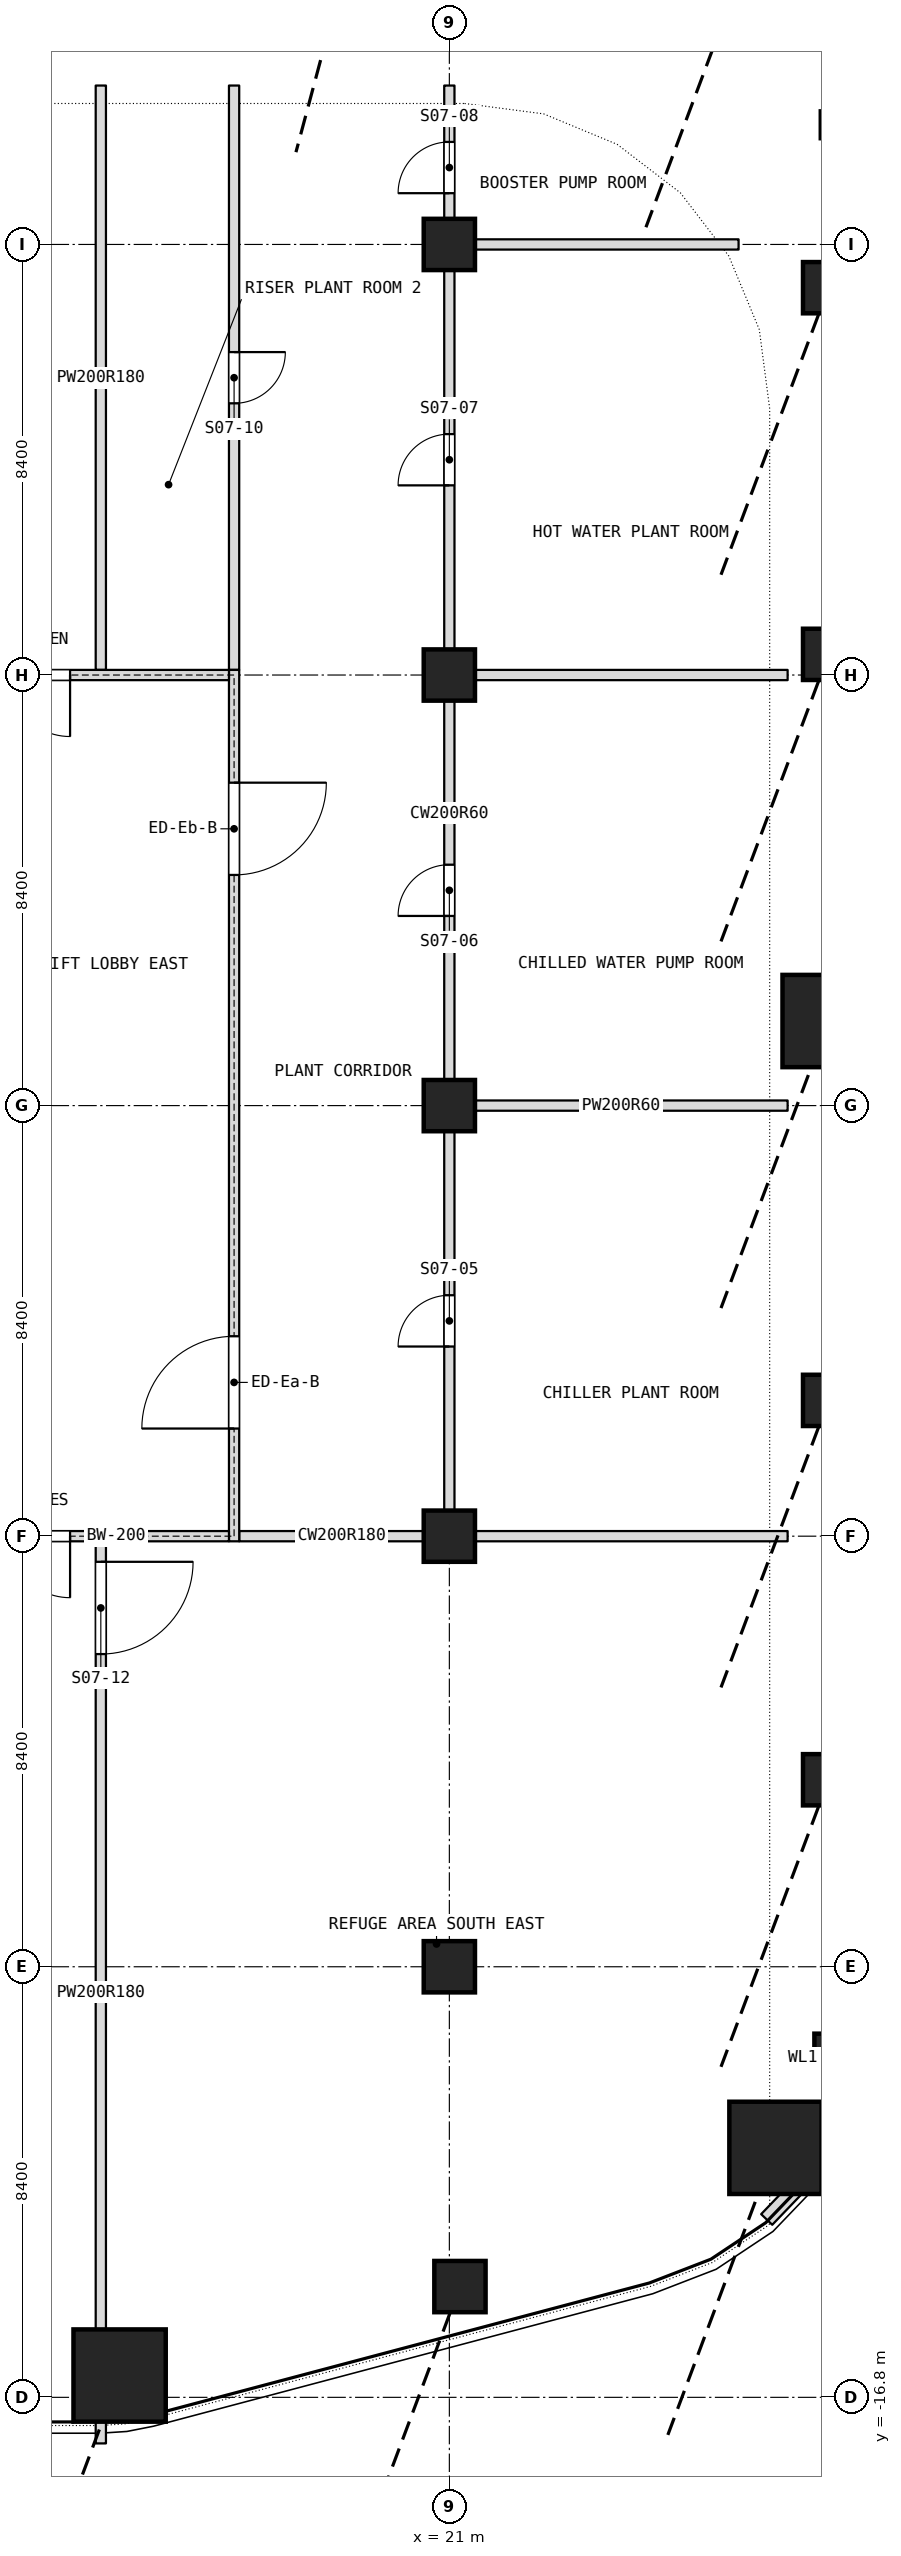
"""IFC4 building model, lengths in metres.
Left out: names, types, materials, properties, quantities, classifications, styles, units other than length and angle.
Written with IfcOpenShell. Run it as: python <this file> out.ifc"""

import sys

from ifc_helpers import new_model, si_unit, direction, frame, frame_2d, origin, origin_2d, place, context, subcontext, project, spatial, rectangle, i_section, extrude, element, fill, save


model = new_model("IFC4")
c1 = context("Model", 3, precision=1e-05, world=origin(), true_north=direction((0.0, 1.0)))
c2 = subcontext(c1, "Body", "Model", "MODEL_VIEW")
j1 = project(units=[si_unit("LENGTHUNIT", "METRE"), si_unit("PLANEANGLEUNIT", "RADIAN")], contexts=[c1])
p1 = place(None, origin())
s1 = spatial("IfcSite", under=j1, at=p1, CompositionType="ELEMENT")
p2 = place(p1, origin())
s2 = spatial("IfcBuilding", under=s1, at=p2, CompositionType="ELEMENT")
p3 = place(p2, frame((0.0, 0.0, 86.9)))
s3 = spatial("IfcBuildingStorey", under=s2, at=p3, CompositionType="ELEMENT", Elevation=86.9)
for number, where, z_axis, x_axis in (
    (1, (21.0, -8.4, 0.0), (0.0, 0.0, 1.0), (1.0, 0.0, 0.0)),
    (2, (21.0, 0.0, 0.0), (0.0, 0.0, 1.0), (1.0, 0.0, 0.0)),
    (3, (21.0, 8.4, 0.0), (0.0, 0.0, 1.0), (1.0, 0.0, 0.0)),
    (4, (21.0, 16.8, 0.0), (0.0, 0.0, 1.0), (1.0, 0.0, 0.0)),
    (5, (21.0, 25.2, 0.0), (0.0, 0.0, 1.0), (1.0, 0.0, 0.0)),
):
    element("IfcColumn", number, at=place(p3, frame(where, z_axis=z_axis, x_axis=x_axis)), inside=s3, PredefinedType="COLUMN", context=c2, shape_type="SweptSolid", body=[
        extrude(rectangle(XDim=1.0, YDim=1.0, at=origin_2d()), origin(), (0.0, 0.0, 1.0), 10.8),
    ])
p4 = place(p3, frame((28.4, 27.534, -0.3), z_axis=(0.0, 0.0, 1.0), x_axis=(1.0, 0.0, 0.0)))
e6 = element("IfcColumn", 6, at=p4, inside=s3, PredefinedType="COLUMN", context=c2, shape_type="SweptSolid", body=[
    extrude(i_section(OverallWidth=0.306, OverallDepth=0.524, WebThickness=0.024, FlangeThickness=0.04, FilletRadius=0.027, at=origin_2d()), origin(), (0.0, 0.0, 1.0), 10.44),
])
for number, where, z_axis, x_axis in (
    (7, (28.4, 24.356, 0.0), (0.0, 0.0, 1.0), (1.0, 0.0, 0.0)),
    (8, (28.4, 17.203, 0.0), (0.0, 0.0, 1.0), (1.0, 0.0, 0.0)),
    (9, (28.4, 10.05, 0.0), (0.0, 0.0, 1.0), (1.0, 0.0, 0.0)),
    (10, (28.4, 2.649, 0.0), (0.0, 0.0, 1.0), (1.0, 0.0, 0.0)),
    (11, (28.4, -4.752, 0.0), (0.0, 0.0, 1.0), (1.0, 0.0, 0.0)),
):
    element("IfcColumn", number, at=place(p3, frame(where, z_axis=z_axis, x_axis=x_axis)), inside=s3, PredefinedType="COLUMN", context=c2, shape_type="SweptSolid", body=[
        extrude(i_section(OverallWidth=0.306, OverallDepth=0.524, WebThickness=0.024, FlangeThickness=0.04, FilletRadius=0.027, at=origin_2d()), origin(), (0.0, 0.0, 1.0), 10.14),
    ])
p5 = place(p3, frame((28.275, -9.967, -0.3), z_axis=(0.0, 0.0, 1.0), x_axis=(1.0, 0.0, 0.0)))
e12 = element("IfcColumn", 12, at=p5, inside=s3, PredefinedType="COLUMN", context=c2, shape_type="SweptSolid", body=[
    extrude(i_section(OverallWidth=0.306, OverallDepth=0.524, WebThickness=0.024, FlangeThickness=0.04, FilletRadius=0.027, at=origin_2d()), origin(), (0.0, 0.0, 1.0), 10.44),
])
p6 = place(p3, frame((27.358, -11.929, 0.0), z_axis=(0.0, 0.0, 1.0), x_axis=(1.0, 0.0, 0.0)))
e13 = element("IfcColumn", 13, at=p6, inside=s3, PredefinedType="COLUMN", context=c2, shape_type="SweptSolid", body=[
    extrude(i_section(OverallWidth=0.306, OverallDepth=0.524, WebThickness=0.024, FlangeThickness=0.04, FilletRadius=0.027, at=origin_2d()), origin(), (0.0, 0.0, 1.0), 10.14),
])
p7 = place(p3, frame((21.0, -0.1, 0.0), z_axis=(0.0, 0.0, 1.0), x_axis=(0.0, 1.0, 0.0)))
e14 = element("IfcWall", 14, at=p7, inside=s3, PredefinedType="PARTITIONING", context=c2, shape_type="SweptSolid", body=[
    extrude(rectangle(XDim=28.4, YDim=0.2, at=frame_2d((14.2, 0.0))), origin(), (0.0, 0.0, 1.0), 10.14),
])
p8 = place(p7, frame((3.8, 0.0, 0.0)))
e15 = element("IfcOpeningElement", 15, at=p8, cuts=e14, PredefinedType="OPENING", context=c2, shape_type="SweptSolid", body=[
    extrude(rectangle(XDim=1.0, YDim=2.1, at=frame_2d((0.5, 1.05))), frame((0.0, 0.1, 0.0), z_axis=(0.0, -1.0, 0.0), x_axis=(1.0, 0.0, 0.0)), (0.0, 0.0, 1.0), 0.2),
])
p9 = place(p7, frame((12.2, 0.0, 0.0)))
e16 = element("IfcOpeningElement", 16, at=p9, cuts=e14, PredefinedType="OPENING", context=c2, shape_type="SweptSolid", body=[
    extrude(rectangle(XDim=1.0, YDim=2.1, at=frame_2d((0.5, 1.05))), frame((0.0, 0.1, 0.0), z_axis=(0.0, -1.0, 0.0), x_axis=(1.0, 0.0, 0.0)), (0.0, 0.0, 1.0), 0.2),
])
p10 = place(p7, frame((20.6, 0.0, 0.0)))
e17 = element("IfcOpeningElement", 17, at=p10, cuts=e14, PredefinedType="OPENING", context=c2, shape_type="SweptSolid", body=[
    extrude(rectangle(XDim=1.0, YDim=2.1, at=frame_2d((0.5, 1.05))), frame((0.0, 0.1, 0.0), z_axis=(0.0, -1.0, 0.0), x_axis=(1.0, 0.0, 0.0)), (0.0, 0.0, 1.0), 0.2),
])
p11 = place(p7, frame((26.3, 0.0, 0.0)))
e18 = element("IfcOpeningElement", 18, at=p11, cuts=e14, PredefinedType="OPENING", context=c2, shape_type="SweptSolid", body=[
    extrude(rectangle(XDim=1.0, YDim=2.1, at=frame_2d((0.5, 1.05))), frame((0.0, 0.1, 0.0), z_axis=(0.0, -1.0, 0.0), x_axis=(1.0, 0.0, 0.0)), (0.0, 0.0, 1.0), 0.2),
])
p12 = place(p3, frame((16.8, 16.9, 0.0), z_axis=(0.0, 0.0, 1.0), x_axis=(0.0, 1.0, 0.0)))
e19 = element("IfcWall", 19, at=p12, inside=s3, PredefinedType="PARTITIONING", context=c2, shape_type="SweptSolid", body=[
    extrude(rectangle(XDim=11.4, YDim=0.2, at=frame_2d((5.7, 0.0))), origin(), (0.0, 0.0, 1.0), 10.14),
])
p13 = place(p12, frame((5.2, 0.0, 0.0)))
e20 = element("IfcOpeningElement", 20, at=p13, cuts=e19, PredefinedType="OPENING", context=c2, shape_type="SweptSolid", body=[
    extrude(rectangle(XDim=1.0, YDim=2.1, at=frame_2d((0.5, 1.05))), frame((0.0, 0.1, 0.0), z_axis=(0.0, -1.0, 0.0), x_axis=(1.0, 0.0, 0.0)), (0.0, 0.0, 1.0), 0.2),
])
p14 = place(p3, frame((14.2, -17.699, 0.0), z_axis=(0.0, 0.0, 1.0), x_axis=(0.0, 1.0, 0.0)))
e21 = element("IfcWall", 21, at=p14, inside=s3, PredefinedType="PARTITIONING", context=c2, shape_type="SweptSolid", body=[
    extrude(rectangle(XDim=17.599, YDim=0.2, at=frame_2d((8.799, 0.0))), origin(), (0.0, 0.0, 1.0), 10.54),
])
p15 = place(p14, frame((15.399, 0.0, 0.0)))
e22 = element("IfcOpeningElement", 22, at=p15, cuts=e21, PredefinedType="OPENING", context=c2, shape_type="SweptSolid", body=[
    extrude(rectangle(XDim=1.8, YDim=2.1, at=frame_2d((0.9, 1.05))), frame((0.0, 0.1, 0.0), z_axis=(0.0, -1.0, 0.0), x_axis=(1.0, 0.0, 0.0)), (0.0, 0.0, 1.0), 0.2),
])
p16 = place(p3, frame((14.2, 16.9, 0.0), z_axis=(0.0, 0.0, 1.0), x_axis=(0.0, 1.0, 0.0)))
e23 = element("IfcWall", 23, at=p16, inside=s3, PredefinedType="PARTITIONING", context=c2, shape_type="SweptSolid", body=[
    extrude(rectangle(XDim=11.4, YDim=0.2, at=frame_2d((5.7, 0.0))), origin(), (0.0, 0.0, 1.0), 10.54),
])
p17 = place(p3, frame((21.1, 0.0, 0.0), z_axis=(0.0, 0.0, 1.0), x_axis=(1.0, 0.0, 0.0)))
e24 = element("IfcWall", 24, at=p17, inside=s3, PredefinedType="PARTITIONING", context=c2, shape_type="SweptSolid", body=[
    extrude(rectangle(XDim=6.5, YDim=0.2, at=frame_2d((3.25, 0.0))), origin(), (0.0, 0.0, 1.0), 10.09),
])
p18 = place(p3, frame((16.9, 0.0, 0.0), z_axis=(0.0, 0.0, 1.0), x_axis=(1.0, 0.0, 0.0)))
e25 = element("IfcWall", 25, at=p18, inside=s3, PredefinedType="PARTITIONING", context=c2, shape_type="SweptSolid", body=[
    extrude(rectangle(XDim=4.0, YDim=0.2, at=frame_2d((2.0, 0.0))), origin(), (0.0, 0.0, 1.0), 10.09),
])
for number, where, z_axis, x_axis in (
    (26, (21.1, 8.4, 0.0), (0.0, 0.0, 1.0), (1.0, 0.0, 0.0)),
    (27, (21.1, 16.8, 0.0), (0.0, 0.0, 1.0), (1.0, 0.0, 0.0)),
):
    element("IfcWall", number, at=place(p3, frame(where, z_axis=z_axis, x_axis=x_axis)), inside=s3, PredefinedType="PARTITIONING", context=c2, shape_type="SweptSolid", body=[
        extrude(rectangle(XDim=6.5, YDim=0.2, at=frame_2d((3.25, 0.0))), origin(), (0.0, 0.0, 1.0), 10.09),
    ])
p19 = place(p3, frame((21.1, 25.2, 0.0), z_axis=(0.0, 0.0, 1.0), x_axis=(1.0, 0.0, 0.0)))
e28 = element("IfcWall", 28, at=p19, inside=s3, PredefinedType="PARTITIONING", context=c2, shape_type="SweptSolid", body=[
    extrude(rectangle(XDim=5.543, YDim=0.2, at=frame_2d((2.771, 0.0))), origin(), (0.0, 0.0, 1.0), 10.09),
])
p20 = place(p3, frame((28.708, -11.346, 10.8), z_axis=(0.0, 0.0, 1.0), x_axis=(-0.519615563943, -0.854400178902, 0.0)))
e29 = element("IfcWall", 29, at=p20, inside=s3, PredefinedType="PARAPET", context=c2, shape_type="SweptSolid", body=[
    extrude(rectangle(XDim=1.309, YDim=0.3, at=frame_2d((0.655, 0.0))), origin(), (0.0, 0.0, 1.0), 1.1),
])
p21 = place(p3, frame((28.047, -12.439, 10.8), z_axis=(0.0, 0.0, 1.0), x_axis=(-0.692433097882, -0.721482089146, 0.0)))
e30 = element("IfcWall", 30, at=p21, inside=s3, PredefinedType="PARAPET", context=c2, shape_type="SweptSolid", body=[
    extrude(rectangle(XDim=1.235, YDim=0.3, at=frame_2d((0.618, 0.0))), origin(), (0.0, 0.0, 1.0), 1.1),
])
p22 = place(p3, frame((16.8, -0.1, 0.0), z_axis=(0.0, 0.0, 1.0), x_axis=(0.0, 1.0, 0.0)))
e31 = element("IfcWall", 31, at=p22, inside=s3, PredefinedType="PARTITIONING", context=c2, shape_type="SweptSolid", body=[
    extrude(rectangle(XDim=17.0, YDim=0.2, at=frame_2d((8.5, 0.0))), origin(), (0.0, 0.0, 1.0), 10.54),
])
p23 = place(p22, frame((2.2, 0.0, 0.0)))
e32 = element("IfcOpeningElement", 32, at=p23, cuts=e31, PredefinedType="OPENING", context=c2, shape_type="SweptSolid", body=[
    extrude(rectangle(XDim=1.8, YDim=2.1, at=frame_2d((0.9, 1.05))), frame((0.0, 0.1, 0.0), z_axis=(0.0, -1.0, 0.0), x_axis=(1.0, 0.0, 0.0)), (0.0, 0.0, 1.0), 0.2),
])
p24 = place(p22, frame((13.0, 0.0, 0.0)))
e33 = element("IfcOpeningElement", 33, at=p24, cuts=e31, PredefinedType="OPENING", context=c2, shape_type="SweptSolid", body=[
    extrude(rectangle(XDim=1.8, YDim=2.1, at=frame_2d((0.9, 1.05))), frame((0.0, 0.1, 0.0), z_axis=(0.0, -1.0, 0.0), x_axis=(1.0, 0.0, 0.0)), (0.0, 0.0, 1.0), 0.2),
])
p25 = place(p3, frame((12.3, 0.0, 0.0), z_axis=(0.0, 0.0, 1.0), x_axis=(1.0, 0.0, 0.0)))
e34 = element("IfcWall", 34, at=p25, inside=s3, PredefinedType="PARTITIONING", context=c2, shape_type="SweptSolid", body=[
    extrude(rectangle(XDim=4.4, YDim=0.2, at=frame_2d((2.2, 0.0))), origin(), (0.0, 0.0, 1.0), 10.09),
])
p26 = place(p25, frame((0.1, 0.0, 0.0)))
e35 = element("IfcOpeningElement", 35, at=p26, cuts=e34, PredefinedType="OPENING", context=c2, shape_type="SweptSolid", body=[
    extrude(rectangle(XDim=1.2, YDim=2.1, at=frame_2d((0.6, 1.05))), frame((0.0, 0.1, 0.0), z_axis=(0.0, -1.0, 0.0), x_axis=(1.0, 0.0, 0.0)), (0.0, 0.0, 1.0), 0.2),
])
p27 = place(p3, frame((12.3, 16.8, 0.0), z_axis=(0.0, 0.0, 1.0), x_axis=(1.0, 0.0, 0.0)))
e36 = element("IfcWall", 36, at=p27, inside=s3, PredefinedType="PARTITIONING", context=c2, shape_type="SweptSolid", body=[
    extrude(rectangle(XDim=4.4, YDim=0.2, at=frame_2d((2.2, 0.0))), origin(), (0.0, 0.0, 1.0), 10.09),
])
p28 = place(p27, frame((0.1, 0.0, 0.0)))
e37 = element("IfcOpeningElement", 37, at=p28, cuts=e36, PredefinedType="OPENING", context=c2, shape_type="SweptSolid", body=[
    extrude(rectangle(XDim=1.2, YDim=2.1, at=frame_2d((0.6, 1.05))), frame((0.0, 0.1, 0.0), z_axis=(0.0, -1.0, 0.0), x_axis=(1.0, 0.0, 0.0)), (0.0, 0.0, 1.0), 0.2),
])
p29 = place(p8, origin())
e38 = element("IfcDoor", 38, at=p29, inside=s3, OperationType="SINGLE_SWING_RIGHT", PredefinedType="DOOR", context=c2, shape_type="SweptSolid", body=[
    extrude(rectangle(XDim=1.0, YDim=2.1, at=frame_2d((0.5, 1.05))), frame((0.0, 0.025, 0.0), z_axis=(0.0, -1.0, 0.0), x_axis=(1.0, 0.0, 0.0)), (0.0, 0.0, 1.0), 0.05),
])
fill(e15, e38)
p30 = place(p9, origin())
e39 = element("IfcDoor", 39, at=p30, inside=s3, OperationType="SINGLE_SWING_LEFT", PredefinedType="DOOR", context=c2, shape_type="SweptSolid", body=[
    extrude(rectangle(XDim=1.0, YDim=2.1, at=frame_2d((0.5, 1.05))), frame((0.0, 0.025, 0.0), z_axis=(0.0, -1.0, 0.0), x_axis=(1.0, 0.0, 0.0)), (0.0, 0.0, 1.0), 0.05),
])
fill(e16, e39)
p31 = place(p10, origin())
e40 = element("IfcDoor", 40, at=p31, inside=s3, OperationType="SINGLE_SWING_RIGHT", PredefinedType="DOOR", context=c2, shape_type="SweptSolid", body=[
    extrude(rectangle(XDim=1.0, YDim=2.1, at=frame_2d((0.5, 1.05))), frame((0.0, 0.025, 0.0), z_axis=(0.0, -1.0, 0.0), x_axis=(1.0, 0.0, 0.0)), (0.0, 0.0, 1.0), 0.05),
])
fill(e17, e40)
p32 = place(p11, origin())
e41 = element("IfcDoor", 41, at=p32, inside=s3, OperationType="SINGLE_SWING_LEFT", PredefinedType="DOOR", context=c2, shape_type="SweptSolid", body=[
    extrude(rectangle(XDim=1.0, YDim=2.1, at=frame_2d((0.5, 1.05))), frame((0.0, 0.025, 0.0), z_axis=(0.0, -1.0, 0.0), x_axis=(1.0, 0.0, 0.0)), (0.0, 0.0, 1.0), 0.05),
])
fill(e18, e41)
p33 = place(p13, origin())
e42 = element("IfcDoor", 42, at=p33, inside=s3, OperationType="SINGLE_SWING_RIGHT", PredefinedType="DOOR", context=c2, shape_type="SweptSolid", body=[
    extrude(rectangle(XDim=1.0, YDim=2.1, at=frame_2d((0.5, 1.05))), frame((0.0, 0.025, 0.0), z_axis=(0.0, -1.0, 0.0), x_axis=(1.0, 0.0, 0.0)), (0.0, 0.0, 1.0), 0.05),
])
fill(e20, e42)
p34 = place(p15, origin())
e43 = element("IfcDoor", 43, at=p34, inside=s3, OperationType="DOUBLE_DOOR_SINGLE_SWING", PredefinedType="DOOR", context=c2, shape_type="SweptSolid", body=[
    extrude(rectangle(XDim=1.8, YDim=2.1, at=frame_2d((0.9, 1.05))), frame((0.0, 0.025, 0.0), z_axis=(0.0, -1.0, 0.0), x_axis=(1.0, 0.0, 0.0)), (0.0, 0.0, 1.0), 0.05),
])
fill(e22, e43)
p35 = place(p23, origin())
e44 = element("IfcDoor", 44, at=p35, inside=s3, OperationType="DOUBLE_DOOR_SINGLE_SWING", PredefinedType="DOOR", context=c2, shape_type="SweptSolid", body=[
    extrude(rectangle(XDim=1.8, YDim=2.1, at=frame_2d((0.9, 1.05))), frame((0.0, 0.025, 0.0), z_axis=(0.0, -1.0, 0.0), x_axis=(1.0, 0.0, 0.0)), (0.0, 0.0, 1.0), 0.05),
])
fill(e32, e44)
p36 = place(p24, origin())
e45 = element("IfcDoor", 45, at=p36, inside=s3, OperationType="DOUBLE_DOOR_SINGLE_SWING", PredefinedType="DOOR", context=c2, shape_type="SweptSolid", body=[
    extrude(rectangle(XDim=1.8, YDim=2.1, at=frame_2d((0.9, 1.05))), frame((0.0, 0.025, 0.0), z_axis=(0.0, -1.0, 0.0), x_axis=(1.0, 0.0, 0.0)), (0.0, 0.0, 1.0), 0.05),
])
fill(e33, e45)
p37 = place(p26, origin())
e46 = element("IfcDoor", 46, at=p37, inside=s3, OperationType="SINGLE_SWING_LEFT", PredefinedType="DOOR", context=c2, shape_type="SweptSolid", body=[
    extrude(rectangle(XDim=1.2, YDim=2.1, at=frame_2d((0.6, 1.05))), frame((0.0, 0.025, 0.0), z_axis=(0.0, -1.0, 0.0), x_axis=(1.0, 0.0, 0.0)), (0.0, 0.0, 1.0), 0.05),
])
fill(e35, e46)
p38 = place(p28, origin())
e47 = element("IfcDoor", 47, at=p38, inside=s3, OperationType="SINGLE_SWING_LEFT", PredefinedType="DOOR", context=c2, shape_type="SweptSolid", body=[
    extrude(rectangle(XDim=1.2, YDim=2.1, at=frame_2d((0.6, 1.05))), frame((0.0, 0.025, 0.0), z_axis=(0.0, -1.0, 0.0), x_axis=(1.0, 0.0, 0.0)), (0.0, 0.0, 1.0), 0.05),
])
fill(e37, e47)
save(model, sys.argv[1])
